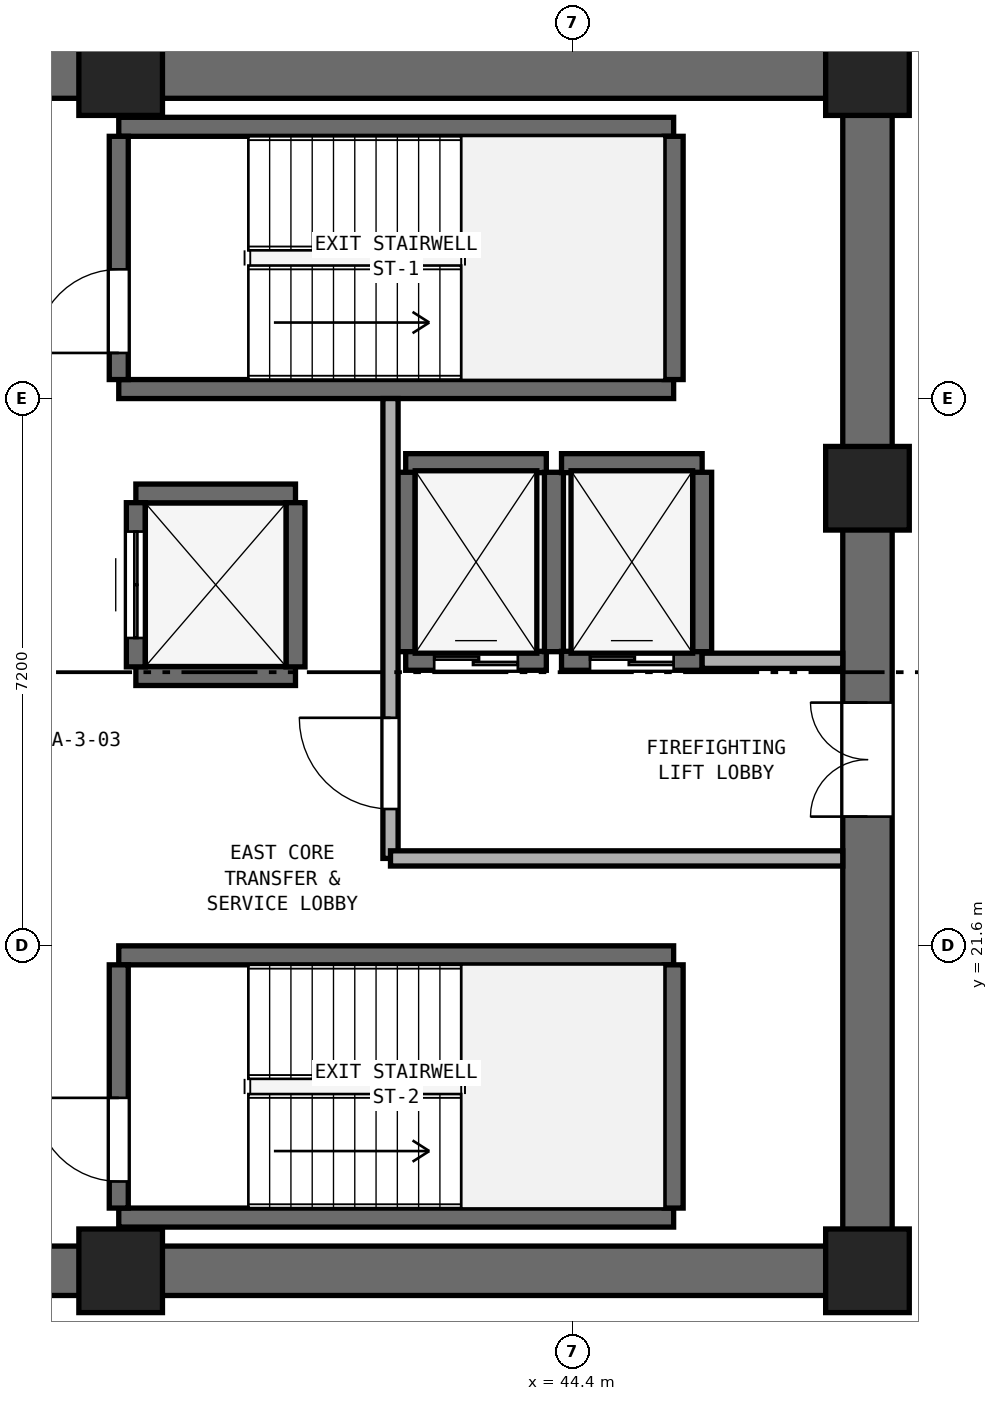
"""IFC4 building model, lengths in metres.
Left out: names, types, materials, properties, quantities, classifications, styles, units other than length and angle.
Written with IfcOpenShell. Run it as: python <this file> out.ifc"""

import sys

from ifc_helpers import new_model, si_unit, direction, frame, frame_2d, origin, origin_2d, place, context, subcontext, project, spatial, rectangle, extrude, element, fill, save


model = new_model("IFC4")
c1 = context("Model", 3, precision=1e-05, world=origin(), true_north=direction((0.0, 1.0)))
c2 = subcontext(c1, "Body", "Model", "MODEL_VIEW")
j1 = project(units=[si_unit("LENGTHUNIT", "METRE"), si_unit("PLANEANGLEUNIT", "RADIAN")], contexts=[c1])
p1 = place(None, origin())
s1 = spatial("IfcSite", under=j1, at=p1, CompositionType="ELEMENT")
p2 = place(p1, origin())
s2 = spatial("IfcBuilding", under=s1, at=p2, CompositionType="ELEMENT")
p3 = place(p2, frame((0.0, 0.0, 47.8)))
s3 = spatial("IfcBuildingStorey", under=s2, at=p3, CompositionType="ELEMENT", Elevation=47.8)
for number, where, z_axis, x_axis in (
    (1, (25.4, 17.325, 0.0), (0.0, 0.0, 1.0), (1.0, 0.0, 0.0)),
    (2, (25.4, 33.075, 0.0), (0.0, 0.0, 1.0), (1.0, 0.0, 0.0)),
):
    element("IfcWall", number, at=place(p3, frame(where, z_axis=z_axis, x_axis=x_axis)), inside=s3, PredefinedType="SHEAR", context=c2, shape_type="SweptSolid", body=[
        extrude(rectangle(XDim=23.2, YDim=0.65, at=frame_2d((11.6, 0.0))), origin(), (0.0, 0.0, 1.0), 3.525),
    ])
p4 = place(p3, frame((48.275, 17.65, 0.0), z_axis=(0.0, 0.0, 1.0), x_axis=(0.0, 1.0, 0.0)))
e3 = element("IfcWall", 3, at=p4, inside=s3, PredefinedType="SHEAR", context=c2, shape_type="SweptSolid", body=[
    extrude(rectangle(XDim=15.1, YDim=0.65, at=frame_2d((7.55, 0.0))), origin(), (0.0, 0.0, 1.0), 3.525),
])
p5 = place(p4, frame((5.65, 0.0, 0.0)))
e4 = element("IfcOpeningElement", 4, at=p5, cuts=e3, PredefinedType="OPENING", context=c2, shape_type="SweptSolid", body=[
    extrude(rectangle(XDim=1.5, YDim=2.15, at=frame_2d((0.75, 1.075))), frame((0.0, 0.335, 0.0), z_axis=(0.0, -1.0, 0.0), x_axis=(1.0, 0.0, 0.0)), (0.0, 0.0, 1.0), 0.67),
])
for number, where, z_axis, x_axis in (
    (5, (38.45, 17.325, 0.0), (0.0, 0.0, 1.0), (1.0, 0.0, 0.0)),
    (6, (48.275, 17.325, 0.0), (0.0, 0.0, 1.0), (1.0, 0.0, 0.0)),
    (7, (48.275, 27.62, 0.0), (0.0, 0.0, 1.0), (1.0, 0.0, 0.0)),
    (8, (48.275, 33.075, 0.0), (0.0, 0.0, 1.0), (1.0, 0.0, 0.0)),
    (9, (38.45, 33.075, 0.0), (0.0, 0.0, 1.0), (1.0, 0.0, 0.0)),
):
    element("IfcColumn", number, at=place(p3, frame(where, z_axis=z_axis, x_axis=x_axis)), inside=s3, PredefinedType="PILASTER", context=c2, shape_type="SweptSolid", body=[
        extrude(rectangle(XDim=1.1, YDim=1.1, at=origin_2d()), origin(), (0.0, 0.0, 1.0), 3.8),
    ])
for number, where, z_axis, x_axis in (
    (10, (38.425, 28.925, 0.0), (0.0, 0.0, 1.0), (1.0, 0.0, 0.0)),
    (11, (38.425, 32.375, 0.0), (0.0, 0.0, 1.0), (1.0, 0.0, 0.0)),
):
    element("IfcWall", number, at=place(p3, frame(where, z_axis=z_axis, x_axis=x_axis)), inside=s3, PredefinedType="SHEAR", context=c2, shape_type="SweptSolid", body=[
        extrude(rectangle(XDim=7.3, YDim=0.25, at=frame_2d((3.65, 0.0))), origin(), (0.0, 0.0, 1.0), 3.525),
    ])
p6 = place(p3, frame((38.425, 29.05, 0.0), z_axis=(0.0, 0.0, 1.0), x_axis=(0.0, 1.0, 0.0)))
e12 = element("IfcWall", 12, at=p6, inside=s3, PredefinedType="SHEAR", context=c2, shape_type="SweptSolid", body=[
    extrude(rectangle(XDim=3.2, YDim=0.25, at=frame_2d((1.6, 0.0))), origin(), (0.0, 0.0, 1.0), 3.525),
])
p7 = place(p6, frame((0.35, 0.0, 0.0)))
e13 = element("IfcOpeningElement", 13, at=p7, cuts=e12, PredefinedType="OPENING", context=c2, shape_type="SweptSolid", body=[
    extrude(rectangle(XDim=1.1, YDim=2.15, at=frame_2d((0.55, 1.075))), frame((0.0, 0.135, 0.0), z_axis=(0.0, -1.0, 0.0), x_axis=(1.0, 0.0, 0.0)), (0.0, 0.0, 1.0), 0.27),
])
p8 = place(p3, frame((45.725, 29.05, 0.0), z_axis=(0.0, 0.0, 1.0), x_axis=(0.0, 1.0, 0.0)))
e14 = element("IfcWall", 14, at=p8, inside=s3, PredefinedType="SHEAR", context=c2, shape_type="SweptSolid", body=[
    extrude(rectangle(XDim=3.2, YDim=0.25, at=frame_2d((1.6, 0.0))), origin(), (0.0, 0.0, 1.0), 3.525),
])
for number, where, z_axis, x_axis in (
    (15, (38.425, 18.025, 0.0), (0.0, 0.0, 1.0), (1.0, 0.0, 0.0)),
    (16, (38.425, 21.475, 0.0), (0.0, 0.0, 1.0), (1.0, 0.0, 0.0)),
):
    element("IfcWall", number, at=place(p3, frame(where, z_axis=z_axis, x_axis=x_axis)), inside=s3, PredefinedType="SHEAR", context=c2, shape_type="SweptSolid", body=[
        extrude(rectangle(XDim=7.3, YDim=0.25, at=frame_2d((3.65, 0.0))), origin(), (0.0, 0.0, 1.0), 3.525),
    ])
p9 = place(p3, frame((38.425, 18.15, 0.0), z_axis=(0.0, 0.0, 1.0), x_axis=(0.0, 1.0, 0.0)))
e17 = element("IfcWall", 17, at=p9, inside=s3, PredefinedType="SHEAR", context=c2, shape_type="SweptSolid", body=[
    extrude(rectangle(XDim=3.2, YDim=0.25, at=frame_2d((1.6, 0.0))), origin(), (0.0, 0.0, 1.0), 3.525),
])
p10 = place(p9, frame((0.35, 0.0, 0.0)))
e18 = element("IfcOpeningElement", 18, at=p10, cuts=e17, PredefinedType="OPENING", context=c2, shape_type="SweptSolid", body=[
    extrude(rectangle(XDim=1.1, YDim=2.15, at=frame_2d((0.55, 1.075))), frame((0.0, 0.135, 0.0), z_axis=(0.0, -1.0, 0.0), x_axis=(1.0, 0.0, 0.0)), (0.0, 0.0, 1.0), 0.27),
])
p11 = place(p3, frame((45.725, 18.15, 0.0), z_axis=(0.0, 0.0, 1.0), x_axis=(0.0, 1.0, 0.0)))
e19 = element("IfcWall", 19, at=p11, inside=s3, PredefinedType="SHEAR", context=c2, shape_type="SweptSolid", body=[
    extrude(rectangle(XDim=3.2, YDim=0.25, at=frame_2d((1.6, 0.0))), origin(), (0.0, 0.0, 1.0), 3.525),
])
p12 = place(p3, frame((42.2, 25.35, 0.0), z_axis=(0.0, 0.0, 1.0), x_axis=(1.0, 0.0, 0.0)))
e20 = element("IfcWall", 20, at=p12, inside=s3, PredefinedType="SHEAR", context=c2, shape_type="SweptSolid", body=[
    extrude(rectangle(XDim=1.85, YDim=0.25, at=frame_2d((0.925, 0.0))), origin(), (0.0, 0.0, 1.0), 3.525),
])
p13 = place(p12, frame((0.375, 0.0, 0.0)))
e21 = element("IfcOpeningElement", 21, at=p13, cuts=e20, PredefinedType="OPENING", context=c2, shape_type="SweptSolid", body=[
    extrude(rectangle(XDim=1.1, YDim=2.15, at=frame_2d((0.55, 1.075))), frame((0.0, 0.135, 0.0), z_axis=(0.0, -1.0, 0.0), x_axis=(1.0, 0.0, 0.0)), (0.0, 0.0, 1.0), 0.27),
])
p14 = place(p3, frame((42.2, 27.95, 0.0), z_axis=(0.0, 0.0, 1.0), x_axis=(1.0, 0.0, 0.0)))
e22 = element("IfcWall", 22, at=p14, inside=s3, PredefinedType="SHEAR", context=c2, shape_type="SweptSolid", body=[
    extrude(rectangle(XDim=1.85, YDim=0.25, at=frame_2d((0.925, 0.0))), origin(), (0.0, 0.0, 1.0), 3.525),
])
for number, where, z_axis, x_axis in (
    (23, (42.2, 25.47, 0.0), (0.0, 0.0, 1.0), (0.0, 1.0, 0.0)),
    (24, (44.15, 25.47, 0.0), (0.0, 0.0, 1.0), (0.0, 1.0, 0.0)),
):
    element("IfcWall", number, at=place(p3, frame(where, z_axis=z_axis, x_axis=x_axis)), inside=s3, PredefinedType="SHEAR", context=c2, shape_type="SweptSolid", body=[
        extrude(rectangle(XDim=2.36, YDim=0.25, at=frame_2d((1.18, 0.0))), origin(), (0.0, 0.0, 1.0), 3.525),
    ])
p15 = place(p3, frame((44.25, 25.35, 0.0), z_axis=(0.0, 0.0, 1.0), x_axis=(1.0, 0.0, 0.0)))
e25 = element("IfcWall", 25, at=p15, inside=s3, PredefinedType="SHEAR", context=c2, shape_type="SweptSolid", body=[
    extrude(rectangle(XDim=1.85, YDim=0.25, at=frame_2d((0.925, 0.0))), origin(), (0.0, 0.0, 1.0), 3.525),
])
p16 = place(p15, frame((0.375, 0.0, 0.0)))
e26 = element("IfcOpeningElement", 26, at=p16, cuts=e25, PredefinedType="OPENING", context=c2, shape_type="SweptSolid", body=[
    extrude(rectangle(XDim=1.1, YDim=2.15, at=frame_2d((0.55, 1.075))), frame((0.0, 0.135, 0.0), z_axis=(0.0, -1.0, 0.0), x_axis=(1.0, 0.0, 0.0)), (0.0, 0.0, 1.0), 0.27),
])
p17 = place(p3, frame((44.25, 27.95, 0.0), z_axis=(0.0, 0.0, 1.0), x_axis=(1.0, 0.0, 0.0)))
e27 = element("IfcWall", 27, at=p17, inside=s3, PredefinedType="SHEAR", context=c2, shape_type="SweptSolid", body=[
    extrude(rectangle(XDim=1.85, YDim=0.25, at=frame_2d((0.925, 0.0))), origin(), (0.0, 0.0, 1.0), 3.525),
])
p18 = place(p3, frame((46.1, 25.47, 0.0), z_axis=(0.0, 0.0, 1.0), x_axis=(0.0, 1.0, 0.0)))
e28 = element("IfcWall", 28, at=p18, inside=s3, PredefinedType="SHEAR", context=c2, shape_type="SweptSolid", body=[
    extrude(rectangle(XDim=2.36, YDim=0.25, at=frame_2d((1.18, 0.0))), origin(), (0.0, 0.0, 1.0), 3.525),
])
for number, where, z_axis, x_axis in (
    (29, (38.65, 25.15, 0.0), (0.0, 0.0, 1.0), (1.0, 0.0, 0.0)),
    (30, (38.65, 27.55, 0.0), (0.0, 0.0, 1.0), (1.0, 0.0, 0.0)),
):
    element("IfcWall", number, at=place(p3, frame(where, z_axis=z_axis, x_axis=x_axis)), inside=s3, PredefinedType="SHEAR", context=c2, shape_type="SweptSolid", body=[
        extrude(rectangle(XDim=2.1, YDim=0.25, at=frame_2d((1.05, 0.0))), origin(), (0.0, 0.0, 1.0), 3.525),
    ])
p19 = place(p3, frame((38.65, 25.27, 0.0), z_axis=(0.0, 0.0, 1.0), x_axis=(0.0, 1.0, 0.0)))
e31 = element("IfcWall", 31, at=p19, inside=s3, PredefinedType="SHEAR", context=c2, shape_type="SweptSolid", body=[
    extrude(rectangle(XDim=2.16, YDim=0.25, at=frame_2d((1.08, 0.0))), origin(), (0.0, 0.0, 1.0), 3.525),
])
p20 = place(p19, frame((0.38, 0.0, 0.0)))
e32 = element("IfcOpeningElement", 32, at=p20, cuts=e31, PredefinedType="OPENING", context=c2, shape_type="SweptSolid", body=[
    extrude(rectangle(XDim=1.4, YDim=2.2, at=frame_2d((0.7, 1.1))), frame((0.0, 0.135, 0.0), z_axis=(0.0, -1.0, 0.0), x_axis=(1.0, 0.0, 0.0)), (0.0, 0.0, 1.0), 0.27),
])
p21 = place(p3, frame((40.75, 25.27, 0.0), z_axis=(0.0, 0.0, 1.0), x_axis=(0.0, 1.0, 0.0)))
e33 = element("IfcWall", 33, at=p21, inside=s3, PredefinedType="SHEAR", context=c2, shape_type="SweptSolid", body=[
    extrude(rectangle(XDim=2.16, YDim=0.25, at=frame_2d((1.08, 0.0))), origin(), (0.0, 0.0, 1.0), 3.525),
])
p22 = place(p3, frame((42.0, 22.75, 0.0), z_axis=(0.0, 0.0, 1.0), x_axis=(0.0, 1.0, 0.0)))
e34 = element("IfcWall", 34, at=p22, inside=s3, PredefinedType="SOLIDWALL", context=c2, shape_type="SweptSolid", body=[
    extrude(rectangle(XDim=6.05, YDim=0.2, at=frame_2d((3.025, 0.0))), origin(), (0.0, 0.0, 1.0), 3.525),
])
p23 = place(p22, frame((0.65, 0.0, 0.0)))
e35 = element("IfcOpeningElement", 35, at=p23, cuts=e34, PredefinedType="OPENING", context=c2, shape_type="SweptSolid", body=[
    extrude(rectangle(XDim=1.2, YDim=2.15, at=frame_2d((0.6, 1.075))), frame((0.0, 0.11, 0.0), z_axis=(0.0, -1.0, 0.0), x_axis=(1.0, 0.0, 0.0)), (0.0, 0.0, 1.0), 0.22),
])
p24 = place(p3, frame((42.0, 22.75, 0.0), z_axis=(0.0, 0.0, 1.0), x_axis=(1.0, 0.0, 0.0)))
e36 = element("IfcWall", 36, at=p24, inside=s3, PredefinedType="SOLIDWALL", context=c2, shape_type="SweptSolid", body=[
    extrude(rectangle(XDim=5.95, YDim=0.2, at=frame_2d((2.975, 0.0))), origin(), (0.0, 0.0, 1.0), 3.525),
])
p25 = place(p3, frame((46.1, 25.35, 0.0), z_axis=(0.0, 0.0, 1.0), x_axis=(1.0, 0.0, 0.0)))
e37 = element("IfcWall", 37, at=p25, inside=s3, PredefinedType="SOLIDWALL", context=c2, shape_type="SweptSolid", body=[
    extrude(rectangle(XDim=1.85, YDim=0.2, at=frame_2d((0.925, 0.0))), origin(), (0.0, 0.0, 1.0), 3.525),
])
p26 = place(p7, origin())
e38 = element("IfcDoor", 38, at=p26, inside=s3, OperationType="SINGLE_SWING_LEFT", PredefinedType="DOOR", context=c2, shape_type="SweptSolid", body=[
    extrude(rectangle(XDim=1.1, YDim=2.15, at=frame_2d((0.55, 1.075))), frame((0.0, 0.025, 0.0), z_axis=(0.0, -1.0, 0.0), x_axis=(1.0, 0.0, 0.0)), (0.0, 0.0, 1.0), 0.05),
])
fill(e13, e38)
p27 = place(p10, origin())
e39 = element("IfcDoor", 39, at=p27, inside=s3, OperationType="SINGLE_SWING_RIGHT", PredefinedType="DOOR", context=c2, shape_type="SweptSolid", body=[
    extrude(rectangle(XDim=1.1, YDim=2.15, at=frame_2d((0.55, 1.075))), frame((0.0, 0.025, 0.0), z_axis=(0.0, -1.0, 0.0), x_axis=(1.0, 0.0, 0.0)), (0.0, 0.0, 1.0), 0.05),
])
fill(e18, e39)
p28 = place(p13, origin())
e40 = element("IfcDoor", 40, at=p28, inside=s3, OperationType="DOUBLE_DOOR_SLIDING", PredefinedType="DOOR", context=c2, shape_type="SweptSolid", body=[
    extrude(rectangle(XDim=1.1, YDim=2.15, at=frame_2d((0.55, 1.075))), frame((0.0, 0.025, 0.0), z_axis=(0.0, -1.0, 0.0), x_axis=(1.0, 0.0, 0.0)), (0.0, 0.0, 1.0), 0.05),
])
fill(e21, e40)
p29 = place(p16, origin())
e41 = element("IfcDoor", 41, at=p29, inside=s3, OperationType="DOUBLE_DOOR_SLIDING", PredefinedType="DOOR", context=c2, shape_type="SweptSolid", body=[
    extrude(rectangle(XDim=1.1, YDim=2.15, at=frame_2d((0.55, 1.075))), frame((0.0, 0.025, 0.0), z_axis=(0.0, -1.0, 0.0), x_axis=(1.0, 0.0, 0.0)), (0.0, 0.0, 1.0), 0.05),
])
fill(e26, e41)
p30 = place(p20, origin())
e42 = element("IfcDoor", 42, at=p30, inside=s3, OperationType="DOUBLE_DOOR_SLIDING", PredefinedType="DOOR", context=c2, shape_type="SweptSolid", body=[
    extrude(rectangle(XDim=1.4, YDim=2.2, at=frame_2d((0.7, 1.1))), frame((0.0, 0.025, 0.0), z_axis=(0.0, -1.0, 0.0), x_axis=(1.0, 0.0, 0.0)), (0.0, 0.0, 1.0), 0.05),
])
fill(e32, e42)
p31 = place(p23, origin())
e43 = element("IfcDoor", 43, at=p31, inside=s3, OperationType="SINGLE_SWING_RIGHT", PredefinedType="DOOR", context=c2, shape_type="SweptSolid", body=[
    extrude(rectangle(XDim=1.2, YDim=2.15, at=frame_2d((0.6, 1.075))), frame((0.0, 0.025, 0.0), z_axis=(0.0, -1.0, 0.0), x_axis=(1.0, 0.0, 0.0)), (0.0, 0.0, 1.0), 0.05),
])
fill(e35, e43)
p32 = place(p5, origin())
e44 = element("IfcDoor", 44, at=p32, inside=s3, OperationType="DOUBLE_DOOR_SINGLE_SWING", PredefinedType="DOOR", context=c2, shape_type="SweptSolid", body=[
    extrude(rectangle(XDim=1.5, YDim=2.15, at=frame_2d((0.75, 1.075))), frame((0.0, 0.025, 0.0), z_axis=(0.0, -1.0, 0.0), x_axis=(1.0, 0.0, 0.0)), (0.0, 0.0, 1.0), 0.05),
])
fill(e4, e44)
save(model, sys.argv[1])
